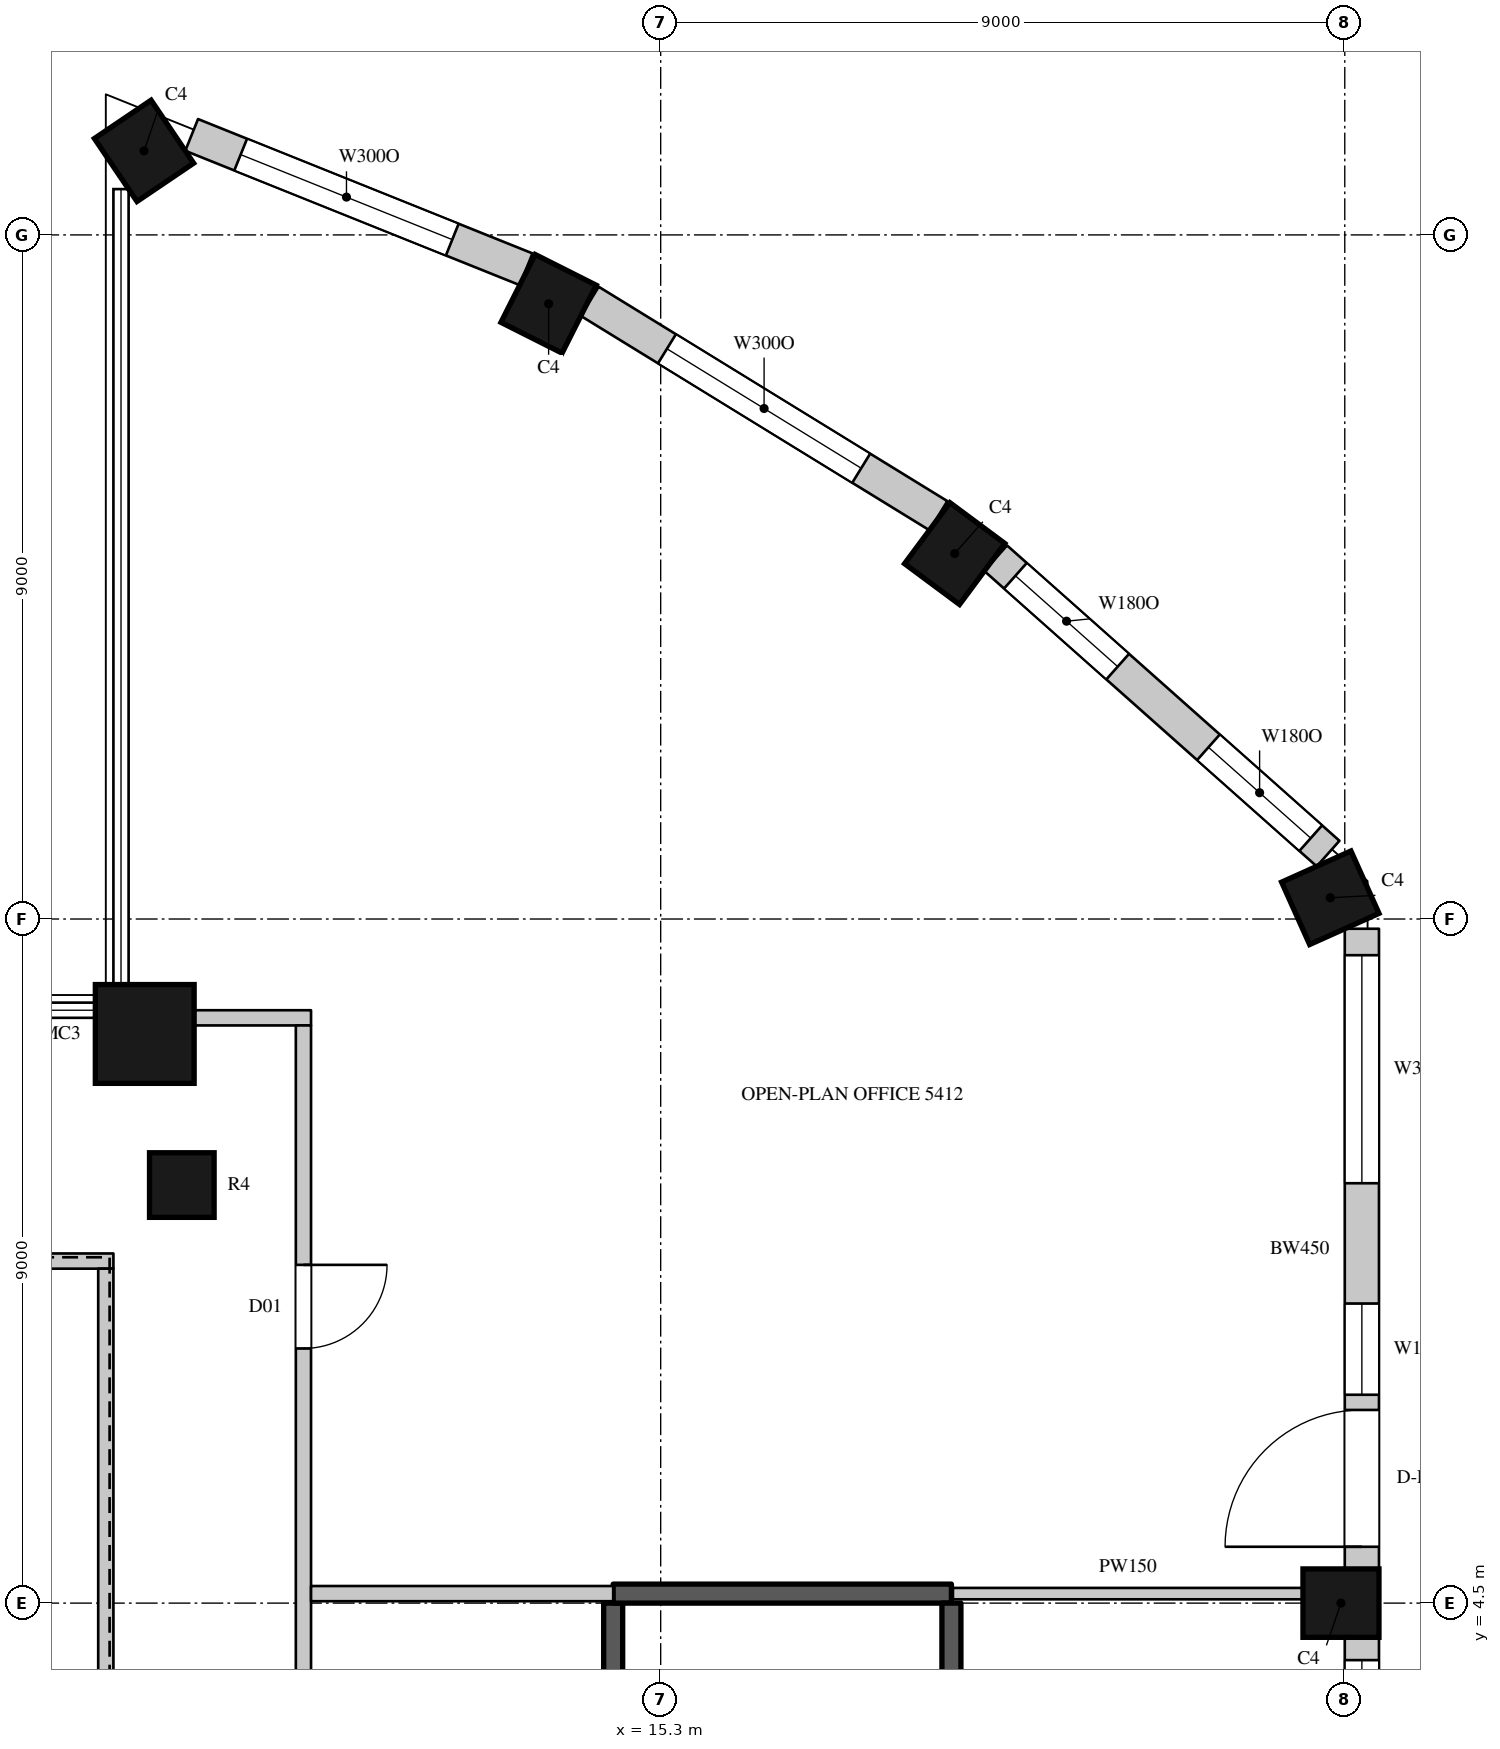
"""IFC4 building model, lengths in metres.
Left out: names, types, materials, properties, quantities, classifications, styles, units other than length and angle.
Written with IfcOpenShell. Run it as: python <this file> out.ifc"""

import sys

from ifc_helpers import new_model, si_unit, direction, frame, frame_2d, origin, origin_2d, place, context, subcontext, project, spatial, rectangle, circle, extrude, element, fill, save


model = new_model("IFC4")
c1 = context("Model", 3, precision=1e-05, world=origin(), true_north=direction((0.0, 1.0)))
c2 = subcontext(c1, "Body", "Model", "MODEL_VIEW")
j1 = project(units=[si_unit("LENGTHUNIT", "METRE"), si_unit("PLANEANGLEUNIT", "RADIAN")], contexts=[c1])
p1 = place(None, origin())
s1 = spatial("IfcSite", under=j1, at=p1, CompositionType="ELEMENT")
p2 = place(p1, origin())
s2 = spatial("IfcBuilding", under=s1, at=p2, CompositionType="ELEMENT")
p3 = place(p2, frame((0.0, 0.0, 243.4)))
s3 = spatial("IfcBuildingStorey", under=s2, at=p3, CompositionType="ELEMENT", Elevation=243.4)
p4 = place(p3, frame((8.503, 23.606, 0.0), z_axis=(0.0, 0.0, 1.0), x_axis=(-0.828469606019, -0.560034027451, 0.0)))
e1 = element("IfcColumn", 1, at=p4, inside=s3, PredefinedType="COLUMN", context=c2, shape_type="SweptSolid", body=[
    extrude(rectangle(XDim=0.9, YDim=1.0, at=origin_2d()), origin(), (0.0, 0.0, 1.0), 4.1),
])
p5 = place(p3, frame((8.512, 11.988, 0.0), z_axis=(0.0, 0.0, 1.0), x_axis=(1.0, 0.0, 0.0)))
e2 = element("IfcColumn", 2, at=p5, inside=s3, PredefinedType="COLUMN", context=c2, shape_type="SweptSolid", body=[
    extrude(circle(Radius=0.65, at=origin_2d()), origin(), (0.0, 0.0, 1.0), 4.1),
])
for number, where, z_axis, x_axis in (
    (3, (24.25, 4.5, 0.0), (0.0, 0.0, 1.0), (0.0, 1.0, 0.0)),
    (4, (24.11, 13.78, 0.0), (0.0, 0.0, 1.0), (-0.41, 0.912, 0.0)),
    (5, (19.168, 18.308, 0.0), (0.0, 0.0, 1.0), (-0.803, 0.596, 0.0)),
    (6, (13.826, 21.594, 0.0), (0.0, 0.0, 1.0), (-0.893, 0.45, 0.0)),
):
    element("IfcColumn", number, at=place(p3, frame(where, z_axis=z_axis, x_axis=x_axis)), inside=s3, PredefinedType="COLUMN", context=c2, shape_type="SweptSolid", body=[
        extrude(rectangle(XDim=0.9, YDim=1.0, at=origin_2d()), origin(), (0.0, 0.0, 1.0), 4.1),
    ])
p6 = place(p3, frame((9.0, 10.0, 0.0), z_axis=(0.0, 0.0, 1.0), x_axis=(1.0, 0.0, 0.0)))
e7 = element("IfcColumn", 7, at=p6, inside=s3, PredefinedType="COLUMN", context=c2, shape_type="SweptSolid", body=[
    extrude(circle(Radius=0.425, at=origin_2d()), origin(), (0.0, 0.0, 1.0), 4.1),
])
p7 = place(p3, frame((24.525, -4.05, 0.0), z_axis=(0.0, 0.0, 1.0), x_axis=(0.0, 1.0, 0.0)))
e8 = element("IfcWall", 8, at=p7, inside=s3, PredefinedType="SOLIDWALL", context=c2, shape_type="SweptSolid", body=[
    extrude(rectangle(XDim=8.1, YDim=0.45, at=frame_2d((4.05, 0.0))), origin(), (0.0, 0.0, 1.0), 3.8),
])
p8 = place(p7, frame((0.3, 0.0, 1.05)))
e9 = element("IfcOpeningElement", 9, at=p8, cuts=e8, PredefinedType="OPENING", context=c2, shape_type="SweptSolid", body=[
    extrude(rectangle(XDim=3.0, YDim=2.4, at=frame_2d((1.5, 1.2))), frame((0.0, 0.235, 0.0), z_axis=(0.0, -1.0, 0.0), x_axis=(1.0, 0.0, 0.0)), (0.0, 0.0, 1.0), 0.47),
])
p9 = place(p7, frame((4.8, 0.0, 1.05)))
e10 = element("IfcOpeningElement", 10, at=p9, cuts=e8, PredefinedType="OPENING", context=c2, shape_type="SweptSolid", body=[
    extrude(rectangle(XDim=3.0, YDim=2.4, at=frame_2d((1.5, 1.2))), frame((0.0, 0.235, 0.0), z_axis=(0.0, -1.0, 0.0), x_axis=(1.0, 0.0, 0.0)), (0.0, 0.0, 1.0), 0.47),
])
p10 = place(p3, frame((24.525, 4.95, 0.0), z_axis=(0.0, 0.0, 1.0), x_axis=(0.0, 1.0, 0.0)))
e11 = element("IfcWall", 11, at=p10, inside=s3, PredefinedType="SOLIDWALL", context=c2, shape_type="SweptSolid", body=[
    extrude(rectangle(XDim=8.422, YDim=0.45, at=frame_2d((4.211, 0.0))), origin(), (0.0, 0.0, 1.0), 3.8),
])
p11 = place(p10, frame((0.291, 0.0, 0.0)))
e12 = element("IfcOpeningElement", 12, at=p11, cuts=e11, PredefinedType="OPENING", context=c2, shape_type="SweptSolid", body=[
    extrude(rectangle(XDim=1.8, YDim=2.4, at=frame_2d((0.9, 1.2))), frame((0.0, 0.235, 0.0), z_axis=(0.0, -1.0, 0.0), x_axis=(1.0, 0.0, 0.0)), (0.0, 0.0, 1.0), 0.47),
])
p12 = place(p10, frame((2.291, 0.0, 1.05)))
e13 = element("IfcOpeningElement", 13, at=p12, cuts=e11, PredefinedType="OPENING", context=c2, shape_type="SweptSolid", body=[
    extrude(rectangle(XDim=1.2, YDim=2.4, at=frame_2d((0.6, 1.2))), frame((0.0, 0.235, 0.0), z_axis=(0.0, -1.0, 0.0), x_axis=(1.0, 0.0, 0.0)), (0.0, 0.0, 1.0), 0.47),
])
p13 = place(p10, frame((5.074, 0.0, 1.05)))
e14 = element("IfcOpeningElement", 14, at=p13, cuts=e11, PredefinedType="OPENING", context=c2, shape_type="SweptSolid", body=[
    extrude(rectangle(XDim=3.0, YDim=2.4, at=frame_2d((1.5, 1.2))), frame((0.0, 0.235, 0.0), z_axis=(0.0, -1.0, 0.0), x_axis=(1.0, 0.0, 0.0)), (0.0, 0.0, 1.0), 0.47),
])
p14 = place(p3, frame((24.081, 14.361, 0.0), z_axis=(0.0, 0.0, 1.0), x_axis=(-0.747570482973, 0.664182484704, 0.0)))
e15 = element("IfcWall", 15, at=p14, inside=s3, PredefinedType="SOLIDWALL", context=c2, shape_type="SweptSolid", body=[
    extrude(rectangle(XDim=5.85, YDim=0.45, at=frame_2d((2.925, 0.0))), origin(), (0.0, 0.0, 1.0), 3.8),
])
p15 = place(p14, frame((0.305, 0.0, 1.05)))
e16 = element("IfcOpeningElement", 16, at=p15, cuts=e15, PredefinedType="OPENING", context=c2, shape_type="SweptSolid", body=[
    extrude(rectangle(XDim=1.8, YDim=2.4, at=frame_2d((0.9, 1.2))), frame((0.0, 0.235, 0.0), z_axis=(0.0, -1.0, 0.0), x_axis=(1.0, 0.0, 0.0)), (0.0, 0.0, 1.0), 0.47),
])
p16 = place(p14, frame((3.703, 0.0, 1.05)))
e17 = element("IfcOpeningElement", 17, at=p16, cuts=e15, PredefinedType="OPENING", context=c2, shape_type="SweptSolid", body=[
    extrude(rectangle(XDim=1.8, YDim=2.4, at=frame_2d((0.9, 1.2))), frame((0.0, 0.235, 0.0), z_axis=(0.0, -1.0, 0.0), x_axis=(1.0, 0.0, 0.0)), (0.0, 0.0, 1.0), 0.47),
])
p17 = place(p3, frame((18.953, 18.806, 0.0), z_axis=(0.0, 0.0, 1.0), x_axis=(-0.851860664503, 0.523768468193, 0.0)))
e18 = element("IfcWall", 18, at=p17, inside=s3, PredefinedType="SOLIDWALL", context=c2, shape_type="SweptSolid", body=[
    extrude(rectangle(XDim=5.384, YDim=0.45, at=frame_2d((2.692, 0.0))), origin(), (0.0, 0.0, 1.0), 3.8),
])
p18 = place(p17, frame((1.192, 0.0, 1.05)))
e19 = element("IfcOpeningElement", 19, at=p18, cuts=e18, PredefinedType="OPENING", context=c2, shape_type="SweptSolid", body=[
    extrude(rectangle(XDim=3.0, YDim=2.4, at=frame_2d((1.5, 1.2))), frame((0.0, 0.235, 0.0), z_axis=(0.0, -1.0, 0.0), x_axis=(1.0, 0.0, 0.0)), (0.0, 0.0, 1.0), 0.47),
])
p19 = place(p3, frame((13.529, 22.048, 0.0), z_axis=(0.0, 0.0, 1.0), x_axis=(-0.927957332619, 0.372686448424, 0.0)))
e20 = element("IfcWall", 20, at=p19, inside=s3, PredefinedType="SOLIDWALL", context=c2, shape_type="SweptSolid", body=[
    extrude(rectangle(XDim=4.741, YDim=0.45, at=frame_2d((2.371, 0.0))), origin(), (0.0, 0.0, 1.0), 3.8),
])
p20 = place(p19, frame((1.047, 0.0, 1.05)))
e21 = element("IfcOpeningElement", 21, at=p20, cuts=e20, PredefinedType="OPENING", context=c2, shape_type="SweptSolid", body=[
    extrude(rectangle(XDim=3.0, YDim=2.4, at=frame_2d((1.5, 1.2))), frame((0.0, 0.235, 0.0), z_axis=(0.0, -1.0, 0.0), x_axis=(1.0, 0.0, 0.0)), (0.0, 0.0, 1.0), 0.47),
])
p21 = place(p3, frame((1.02, 9.0, 0.0), z_axis=(0.0, 0.0, 1.0), x_axis=(1.0, 0.0, 0.0)))
e22 = element("IfcWall", 22, at=p21, inside=s3, PredefinedType="PARTITIONING", context=c2, shape_type="SweptSolid", body=[
    extrude(rectangle(XDim=7.08, YDim=0.2, at=frame_2d((3.54, 0.0))), origin(), (0.0, 0.0, 1.0), 3.8),
])
p22 = place(p3, frame((8.0, -8.9, 0.0), z_axis=(0.0, 0.0, 1.0), x_axis=(0.0, 1.0, 0.0)))
e23 = element("IfcWall", 23, at=p22, inside=s3, PredefinedType="PARTITIONING", context=c2, shape_type="SweptSolid", body=[
    extrude(rectangle(XDim=17.8, YDim=0.2, at=frame_2d((8.9, 0.0))), origin(), (0.0, 0.0, 1.0), 3.8),
])
p23 = place(p3, frame((9.144, 12.2, 0.0), z_axis=(0.0, 0.0, 1.0), x_axis=(1.0, 0.0, 0.0)))
e24 = element("IfcWall", 24, at=p23, inside=s3, PredefinedType="PARTITIONING", context=c2, shape_type="SweptSolid", body=[
    extrude(rectangle(XDim=1.556, YDim=0.2, at=frame_2d((0.778, 0.0))), origin(), (0.0, 0.0, 1.0), 3.8),
])
p24 = place(p3, frame((10.6, -11.6, 0.0), z_axis=(0.0, 0.0, 1.0), x_axis=(0.0, 1.0, 0.0)))
e25 = element("IfcWall", 25, at=p24, inside=s3, PredefinedType="PARTITIONING", context=c2, shape_type="SweptSolid", body=[
    extrude(rectangle(XDim=23.7, YDim=0.2, at=frame_2d((11.85, 0.0))), origin(), (0.0, 0.0, 1.0), 3.8),
])
p25 = place(p24, frame((9.45, 0.0, 0.0)))
e26 = element("IfcOpeningElement", 26, at=p25, cuts=e25, PredefinedType="OPENING", context=c2, shape_type="SweptSolid", body=[
    extrude(rectangle(XDim=1.5, YDim=2.4, at=frame_2d((0.75, 1.2))), frame((0.0, 0.11, 0.0), z_axis=(0.0, -1.0, 0.0), x_axis=(1.0, 0.0, 0.0)), (0.0, 0.0, 1.0), 0.22),
])
p26 = place(p24, frame((19.45, 0.0, 0.0)))
e27 = element("IfcOpeningElement", 27, at=p26, cuts=e25, PredefinedType="OPENING", context=c2, shape_type="SweptSolid", body=[
    extrude(rectangle(XDim=1.1, YDim=2.4, at=frame_2d((0.55, 1.2))), frame((0.0, 0.11, 0.0), z_axis=(0.0, -1.0, 0.0), x_axis=(1.0, 0.0, 0.0)), (0.0, 0.0, 1.0), 0.22),
])
p27 = place(p24, frame((4.6, 0.0, 0.0)))
e28 = element("IfcOpeningElement", 28, at=p27, cuts=e25, PredefinedType="OPENING", context=c2, shape_type="SweptSolid", body=[
    extrude(rectangle(XDim=1.1, YDim=2.4, at=frame_2d((0.55, 1.2))), frame((0.0, 0.11, 0.0), z_axis=(0.0, -1.0, 0.0), x_axis=(1.0, 0.0, 0.0)), (0.0, 0.0, 1.0), 0.22),
])
p28 = place(p3, frame((10.7, 4.625, 0.0), z_axis=(0.0, 0.0, 1.0), x_axis=(1.0, 0.0, 0.0)))
e29 = element("IfcWall", 29, at=p28, inside=s3, PredefinedType="PARTITIONING", context=c2, shape_type="SweptSolid", body=[
    extrude(rectangle(XDim=3.975, YDim=0.2, at=frame_2d((1.988, 0.0))), origin(), (0.0, 0.0, 1.0), 3.8),
])
p29 = place(p3, frame((19.145, 4.625, 0.0), z_axis=(0.0, 0.0, 1.0), x_axis=(1.0, 0.0, 0.0)))
e30 = element("IfcWall", 30, at=p29, inside=s3, PredefinedType="PARTITIONING", context=c2, shape_type="SweptSolid", body=[
    extrude(rectangle(XDim=4.605, YDim=0.15, at=frame_2d((2.302, 0.0))), origin(), (0.0, 0.0, 1.0), 3.8),
])
p30 = place(p3, frame((14.675, -4.5, 0.0), z_axis=(0.0, 0.0, 1.0), x_axis=(0.0, 1.0, 0.0)))
e31 = element("IfcWall", 31, at=p30, inside=s3, PredefinedType="SHEAR", context=c2, shape_type="SweptSolid", body=[
    extrude(rectangle(XDim=9.0, YDim=0.25, at=frame_2d((4.5, 0.0))), origin(), (0.0, 0.0, 1.0), 3.8),
])
p31 = place(p30, frame((0.45, 0.0, 0.0)))
e32 = element("IfcOpeningElement", 32, at=p31, cuts=e31, PredefinedType="OPENING", context=c2, shape_type="SweptSolid", body=[
    extrude(rectangle(XDim=1.1, YDim=2.2, at=frame_2d((0.55, 1.1))), frame((0.0, 0.135, 0.0), z_axis=(0.0, -1.0, 0.0), x_axis=(1.0, 0.0, 0.0)), (0.0, 0.0, 1.0), 0.27),
])
p32 = place(p3, frame((14.675, 4.625, 0.0), z_axis=(0.0, 0.0, 1.0), x_axis=(1.0, 0.0, 0.0)))
e33 = element("IfcWall", 33, at=p32, inside=s3, PredefinedType="SHEAR", context=c2, shape_type="SweptSolid", body=[
    extrude(rectangle(XDim=4.45, YDim=0.25, at=frame_2d((2.225, 0.0))), origin(), (0.0, 0.0, 1.0), 3.8),
])
p33 = place(p3, frame((19.125, -4.5, 0.0), z_axis=(0.0, 0.0, 1.0), x_axis=(0.0, 1.0, 0.0)))
e34 = element("IfcWall", 34, at=p33, inside=s3, PredefinedType="SHEAR", context=c2, shape_type="SweptSolid", body=[
    extrude(rectangle(XDim=9.0, YDim=0.25, at=frame_2d((4.5, 0.0))), origin(), (0.0, 0.0, 1.0), 3.8),
])
p34 = place(p9, origin())
e35 = element("IfcWindow", 35, at=p34, inside=s3, PartitioningType="SINGLE_PANEL", PredefinedType="WINDOW", context=c2, shape_type="SweptSolid", body=[
    extrude(rectangle(XDim=3.0, YDim=2.4, at=frame_2d((1.5, 1.2))), frame((0.0, 0.135, 0.0), z_axis=(0.0, -1.0, 0.0), x_axis=(1.0, 0.0, 0.0)), (0.0, 0.0, 1.0), 0.06),
])
fill(e10, e35)
p35 = place(p11, origin())
e36 = element("IfcDoor", 36, at=p35, inside=s3, OperationType="SLIDING_TO_LEFT", PredefinedType="DOOR", context=c2, shape_type="SweptSolid", body=[
    extrude(rectangle(XDim=1.8, YDim=2.4, at=frame_2d((0.9, 1.2))), frame((0.0, 0.13, 0.0), z_axis=(0.0, -1.0, 0.0), x_axis=(1.0, 0.0, 0.0)), (0.0, 0.0, 1.0), 0.05),
])
fill(e12, e36)
p36 = place(p12, origin())
e37 = element("IfcWindow", 37, at=p36, inside=s3, PartitioningType="SINGLE_PANEL", PredefinedType="WINDOW", context=c2, shape_type="SweptSolid", body=[
    extrude(rectangle(XDim=1.2, YDim=2.4, at=frame_2d((0.6, 1.2))), frame((0.0, 0.135, 0.0), z_axis=(0.0, -1.0, 0.0), x_axis=(1.0, 0.0, 0.0)), (0.0, 0.0, 1.0), 0.06),
])
fill(e13, e37)
p37 = place(p13, origin())
e38 = element("IfcWindow", 38, at=p37, inside=s3, PartitioningType="SINGLE_PANEL", PredefinedType="WINDOW", context=c2, shape_type="SweptSolid", body=[
    extrude(rectangle(XDim=3.0, YDim=2.4, at=frame_2d((1.5, 1.2))), frame((0.0, 0.135, 0.0), z_axis=(0.0, -1.0, 0.0), x_axis=(1.0, 0.0, 0.0)), (0.0, 0.0, 1.0), 0.06),
])
fill(e14, e38)
p38 = place(p15, origin())
e39 = element("IfcWindow", 39, at=p38, inside=s3, PartitioningType="SINGLE_PANEL", PredefinedType="WINDOW", context=c2, shape_type="SweptSolid", body=[
    extrude(rectangle(XDim=1.8, YDim=2.4, at=frame_2d((0.9, 1.2))), frame((0.0, 0.135, 0.0), z_axis=(0.0, -1.0, 0.0), x_axis=(1.0, 0.0, 0.0)), (0.0, 0.0, 1.0), 0.06),
])
fill(e16, e39)
p39 = place(p16, origin())
e40 = element("IfcWindow", 40, at=p39, inside=s3, PartitioningType="SINGLE_PANEL", PredefinedType="WINDOW", context=c2, shape_type="SweptSolid", body=[
    extrude(rectangle(XDim=1.8, YDim=2.4, at=frame_2d((0.9, 1.2))), frame((0.0, 0.135, 0.0), z_axis=(0.0, -1.0, 0.0), x_axis=(1.0, 0.0, 0.0)), (0.0, 0.0, 1.0), 0.06),
])
fill(e17, e40)
p40 = place(p18, origin())
e41 = element("IfcWindow", 41, at=p40, inside=s3, PartitioningType="SINGLE_PANEL", PredefinedType="WINDOW", context=c2, shape_type="SweptSolid", body=[
    extrude(rectangle(XDim=3.0, YDim=2.4, at=frame_2d((1.5, 1.2))), frame((0.0, 0.135, 0.0), z_axis=(0.0, -1.0, 0.0), x_axis=(1.0, 0.0, 0.0)), (0.0, 0.0, 1.0), 0.06),
])
fill(e19, e41)
p41 = place(p20, origin())
e42 = element("IfcWindow", 42, at=p41, inside=s3, PartitioningType="SINGLE_PANEL", PredefinedType="WINDOW", context=c2, shape_type="SweptSolid", body=[
    extrude(rectangle(XDim=3.0, YDim=2.4, at=frame_2d((1.5, 1.2))), frame((0.0, 0.135, 0.0), z_axis=(0.0, -1.0, 0.0), x_axis=(1.0, 0.0, 0.0)), (0.0, 0.0, 1.0), 0.06),
])
fill(e21, e42)
p42 = place(p26, origin())
e43 = element("IfcDoor", 43, at=p42, inside=s3, OperationType="SINGLE_SWING_LEFT", PredefinedType="DOOR", context=c2, shape_type="SweptSolid", body=[
    extrude(rectangle(XDim=1.1, YDim=2.4, at=frame_2d((0.55, 1.2))), frame((0.0, 0.025, 0.0), z_axis=(0.0, -1.0, 0.0), x_axis=(1.0, 0.0, 0.0)), (0.0, 0.0, 1.0), 0.05),
])
fill(e27, e43)
save(model, sys.argv[1])
